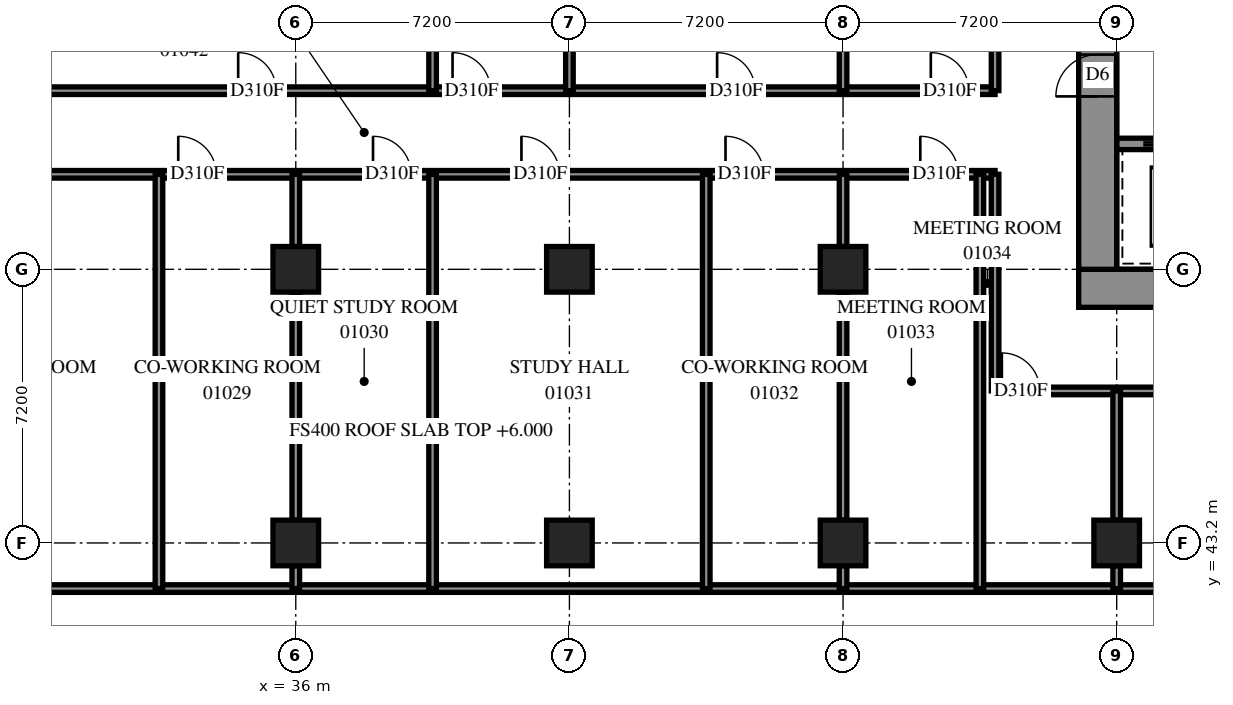
"""IFC4 building model, lengths in metres.
Left out: names, types, materials, properties, quantities, classifications, styles, units other than length and angle.
Written with IfcOpenShell. Run it as: python <this file> out.ifc"""

import sys

from ifc_helpers import new_model, si_unit, direction, frame, frame_2d, origin, origin_2d, place, context, subcontext, project, spatial, rectangle, extrude, element, fill, save


model = new_model("IFC4")
c1 = context("Model", 3, precision=1e-05, world=origin(), true_north=direction((0.0, 1.0)))
c2 = subcontext(c1, "Body", "Model", "MODEL_VIEW")
j1 = project(units=[si_unit("LENGTHUNIT", "METRE"), si_unit("PLANEANGLEUNIT", "RADIAN")], contexts=[c1])
p1 = place(None, origin())
s1 = spatial("IfcSite", under=j1, at=p1, CompositionType="ELEMENT")
p2 = place(p1, origin())
s2 = spatial("IfcBuilding", under=s1, at=p2, CompositionType="ELEMENT")
p3 = place(p2, frame((0.0, 0.0, 6.0)))
s3 = spatial("IfcBuildingStorey", under=s2, at=p3, CompositionType="ELEMENT", Elevation=6.0)
for number, where, z_axis, x_axis in (
    (1, (36.0, 43.2, 0.0), (0.0, 0.0, 1.0), (1.0, 0.0, 0.0)),
    (2, (36.0, 50.4, 0.0), (0.0, 0.0, 1.0), (1.0, 0.0, 0.0)),
    (3, (43.2, 43.2, 0.0), (0.0, 0.0, 1.0), (1.0, 0.0, 0.0)),
    (4, (43.2, 50.4, 0.0), (0.0, 0.0, 1.0), (1.0, 0.0, 0.0)),
    (5, (50.4, 43.2, 0.0), (0.0, 0.0, 1.0), (1.0, 0.0, 0.0)),
    (6, (50.4, 50.4, 0.0), (0.0, 0.0, 1.0), (1.0, 0.0, 0.0)),
    (7, (57.6, 43.2, 0.0), (0.0, 0.0, 1.0), (1.0, 0.0, 0.0)),
):
    element("IfcColumn", number, at=place(p3, frame(where, z_axis=z_axis, x_axis=x_axis)), inside=s3, PredefinedType="COLUMN", context=c2, shape_type="SweptSolid", body=[
        extrude(rectangle(XDim=1.2, YDim=1.2, at=origin_2d()), origin(), (0.0, 0.0, 1.0), 3.8),
    ])
p4 = place(p3, frame((56.6, 49.9, -0.4), z_axis=(0.0, 0.0, 1.0), x_axis=(1.0, 0.0, 0.0)))
e8 = element("IfcWall", 8, at=p4, inside=s3, PredefinedType="SHEAR", context=c2, shape_type="SweptSolid", body=[
    extrude(rectangle(XDim=16.4, YDim=1.0, at=frame_2d((8.2, 0.0))), origin(), (0.0, 0.0, 1.0), 3.5),
])
p5 = place(p3, frame((57.1, 50.4, -0.4), z_axis=(0.0, 0.0, 1.0), x_axis=(0.0, 1.0, 0.0)))
e9 = element("IfcWall", 9, at=p5, inside=s3, PredefinedType="SHEAR", context=c2, shape_type="SweptSolid", body=[
    extrude(rectangle(XDim=14.4, YDim=1.0, at=frame_2d((7.2, 0.0))), origin(), (0.0, 0.0, 1.0), 3.5),
])
p6 = place(p5, frame((4.55, 0.0, 0.4)))
e10 = element("IfcOpeningElement", 10, at=p6, cuts=e9, PredefinedType="OPENING", context=c2, shape_type="SweptSolid", body=[
    extrude(rectangle(XDim=1.1, YDim=2.1, at=frame_2d((0.55, 1.05))), frame((0.0, 0.51, 0.0), z_axis=(0.0, -1.0, 0.0), x_axis=(1.0, 0.0, 0.0)), (0.0, 0.0, 1.0), 1.02),
])
p7 = place(p5, frame((11.35, 0.0, 0.4)))
e11 = element("IfcOpeningElement", 11, at=p7, cuts=e9, PredefinedType="OPENING", context=c2, shape_type="SweptSolid", body=[
    extrude(rectangle(XDim=1.1, YDim=2.1, at=frame_2d((0.55, 1.05))), frame((0.0, 0.51, 0.0), z_axis=(0.0, -1.0, 0.0), x_axis=(1.0, 0.0, 0.0)), (0.0, 0.0, 1.0), 1.02),
])
p8 = place(p3, frame((57.6, 53.7, 0.0), z_axis=(0.0, 0.0, 1.0), x_axis=(1.0, 0.0, 0.0)))
e12 = element("IfcWall", 12, at=p8, inside=s3, PredefinedType="SOLIDWALL", context=c2, shape_type="SweptSolid", body=[
    extrude(rectangle(XDim=14.4, YDim=0.3, at=frame_2d((7.2, 0.0))), origin(), (0.0, 0.0, 1.0), 3.8),
])
p9 = place(p8, frame((1.25, 0.0, 0.0)))
e13 = element("IfcOpeningElement", 13, at=p9, cuts=e12, PredefinedType="OPENING", context=c2, shape_type="SweptSolid", body=[
    extrude(rectangle(XDim=1.1, YDim=2.1, at=frame_2d((0.55, 1.05))), frame((0.0, 0.16, 0.0), z_axis=(0.0, -1.0, 0.0), x_axis=(1.0, 0.0, 0.0)), (0.0, 0.0, 1.0), 0.32),
])
p10 = place(p8, frame((4.85, 0.0, 0.0)))
e14 = element("IfcOpeningElement", 14, at=p10, cuts=e12, PredefinedType="OPENING", context=c2, shape_type="SweptSolid", body=[
    extrude(rectangle(XDim=1.1, YDim=2.1, at=frame_2d((0.55, 1.05))), frame((0.0, 0.16, 0.0), z_axis=(0.0, -1.0, 0.0), x_axis=(1.0, 0.0, 0.0)), (0.0, 0.0, 1.0), 0.32),
])
p11 = place(p8, frame((8.45, 0.0, 0.0)))
e15 = element("IfcOpeningElement", 15, at=p11, cuts=e12, PredefinedType="OPENING", context=c2, shape_type="SweptSolid", body=[
    extrude(rectangle(XDim=1.1, YDim=2.1, at=frame_2d((0.55, 1.05))), frame((0.0, 0.16, 0.0), z_axis=(0.0, -1.0, 0.0), x_axis=(1.0, 0.0, 0.0)), (0.0, 0.0, 1.0), 0.32),
])
p12 = place(p8, frame((12.05, 0.0, 0.0)))
e16 = element("IfcOpeningElement", 16, at=p12, cuts=e12, PredefinedType="OPENING", context=c2, shape_type="SweptSolid", body=[
    extrude(rectangle(XDim=1.1, YDim=2.1, at=frame_2d((0.55, 1.05))), frame((0.0, 0.16, 0.0), z_axis=(0.0, -1.0, 0.0), x_axis=(1.0, 0.0, 0.0)), (0.0, 0.0, 1.0), 0.32),
])
p13 = place(p3, frame((13.33, 42.0, 0.0), z_axis=(0.0, 0.0, 1.0), x_axis=(1.0, 0.0, 0.0)))
e17 = element("IfcWall", 17, at=p13, inside=s3, PredefinedType="PARTITIONING", context=c2, shape_type="SweptSolid", body=[
    extrude(rectangle(XDim=59.74, YDim=0.2, at=frame_2d((29.87, 0.0))), origin(), (0.0, 0.0, 1.0), 3.8),
])
p14 = place(p3, frame((0.0, 55.1, 0.0), z_axis=(0.0, 0.0, 1.0), x_axis=(1.0, 0.0, 0.0)))
e18 = element("IfcWall", 18, at=p14, inside=s3, PredefinedType="PARTITIONING", context=c2, shape_type="SweptSolid", body=[
    extrude(rectangle(XDim=54.4, YDim=0.2, at=frame_2d((27.2, 0.0))), origin(), (0.0, 0.0, 1.0), 3.8),
])
p15 = place(p14, frame((10.485, 0.0, 0.0)))
e19 = element("IfcOpeningElement", 19, at=p15, cuts=e18, PredefinedType="OPENING", context=c2, shape_type="SweptSolid", body=[
    extrude(rectangle(XDim=1.0, YDim=2.1, at=frame_2d((0.5, 1.05))), frame((0.0, 0.11, 0.0), z_axis=(0.0, -1.0, 0.0), x_axis=(1.0, 0.0, 0.0)), (0.0, 0.0, 1.0), 0.22),
])
p16 = place(p14, frame((16.475, 0.0, 0.0)))
e20 = element("IfcOpeningElement", 20, at=p16, cuts=e18, PredefinedType="OPENING", context=c2, shape_type="SweptSolid", body=[
    extrude(rectangle(XDim=1.0, YDim=2.1, at=frame_2d((0.5, 1.05))), frame((0.0, 0.11, 0.0), z_axis=(0.0, -1.0, 0.0), x_axis=(1.0, 0.0, 0.0)), (0.0, 0.0, 1.0), 0.22),
])
p17 = place(p14, frame((22.025, 0.0, 0.0)))
e21 = element("IfcOpeningElement", 21, at=p17, cuts=e18, PredefinedType="OPENING", context=c2, shape_type="SweptSolid", body=[
    extrude(rectangle(XDim=1.0, YDim=2.1, at=frame_2d((0.5, 1.05))), frame((0.0, 0.11, 0.0), z_axis=(0.0, -1.0, 0.0), x_axis=(1.0, 0.0, 0.0)), (0.0, 0.0, 1.0), 0.22),
])
p18 = place(p14, frame((34.484, 0.0, 0.0)))
e22 = element("IfcOpeningElement", 22, at=p18, cuts=e18, PredefinedType="OPENING", context=c2, shape_type="SweptSolid", body=[
    extrude(rectangle(XDim=1.0, YDim=2.1, at=frame_2d((0.5, 1.05))), frame((0.0, 0.11, 0.0), z_axis=(0.0, -1.0, 0.0), x_axis=(1.0, 0.0, 0.0)), (0.0, 0.0, 1.0), 0.22),
])
p19 = place(p14, frame((40.125, 0.0, 0.0)))
e23 = element("IfcOpeningElement", 23, at=p19, cuts=e18, PredefinedType="OPENING", context=c2, shape_type="SweptSolid", body=[
    extrude(rectangle(XDim=1.0, YDim=2.1, at=frame_2d((0.5, 1.05))), frame((0.0, 0.11, 0.0), z_axis=(0.0, -1.0, 0.0), x_axis=(1.0, 0.0, 0.0)), (0.0, 0.0, 1.0), 0.22),
])
p20 = place(p14, frame((47.086, 0.0, 0.0)))
e24 = element("IfcOpeningElement", 24, at=p20, cuts=e18, PredefinedType="OPENING", context=c2, shape_type="SweptSolid", body=[
    extrude(rectangle(XDim=1.0, YDim=2.1, at=frame_2d((0.5, 1.05))), frame((0.0, 0.11, 0.0), z_axis=(0.0, -1.0, 0.0), x_axis=(1.0, 0.0, 0.0)), (0.0, 0.0, 1.0), 0.22),
])
p21 = place(p14, frame((52.709, 0.0, 0.0)))
e25 = element("IfcOpeningElement", 25, at=p21, cuts=e18, PredefinedType="OPENING", context=c2, shape_type="SweptSolid", body=[
    extrude(rectangle(XDim=1.0, YDim=2.1, at=frame_2d((0.5, 1.05))), frame((0.0, 0.11, 0.0), z_axis=(0.0, -1.0, 0.0), x_axis=(1.0, 0.0, 0.0)), (0.0, 0.0, 1.0), 0.22),
])
p22 = place(p14, frame((2.451, 0.0, 0.0)))
e26 = element("IfcOpeningElement", 26, at=p22, cuts=e18, PredefinedType="OPENING", context=c2, shape_type="SweptSolid", body=[
    extrude(rectangle(XDim=1.0, YDim=2.1, at=frame_2d((0.5, 1.05))), frame((0.0, 0.11, 0.0), z_axis=(0.0, -1.0, 0.0), x_axis=(1.0, 0.0, 0.0)), (0.0, 0.0, 1.0), 0.22),
])
p23 = place(p3, frame((0.0, 52.9, 0.0), z_axis=(0.0, 0.0, 1.0), x_axis=(1.0, 0.0, 0.0)))
e27 = element("IfcWall", 27, at=p23, inside=s3, PredefinedType="PARTITIONING", context=c2, shape_type="SweptSolid", body=[
    extrude(rectangle(XDim=54.4, YDim=0.2, at=frame_2d((27.2, 0.0))), origin(), (0.0, 0.0, 1.0), 3.8),
])
p24 = place(p23, frame((8.689, 0.0, 0.0)))
e28 = element("IfcOpeningElement", 28, at=p24, cuts=e27, PredefinedType="OPENING", context=c2, shape_type="SweptSolid", body=[
    extrude(rectangle(XDim=1.0, YDim=2.1, at=frame_2d((0.5, 1.05))), frame((0.0, 0.11, 0.0), z_axis=(0.0, -1.0, 0.0), x_axis=(1.0, 0.0, 0.0)), (0.0, 0.0, 1.0), 0.22),
])
p25 = place(p23, frame((11.325, 0.0, 0.0)))
e29 = element("IfcOpeningElement", 29, at=p25, cuts=e27, PredefinedType="OPENING", context=c2, shape_type="SweptSolid", body=[
    extrude(rectangle(XDim=1.0, YDim=2.1, at=frame_2d((0.5, 1.05))), frame((0.0, 0.11, 0.0), z_axis=(0.0, -1.0, 0.0), x_axis=(1.0, 0.0, 0.0)), (0.0, 0.0, 1.0), 0.22),
])
p26 = place(p23, frame((18.262, 0.0, 0.0)))
e30 = element("IfcOpeningElement", 30, at=p26, cuts=e27, PredefinedType="OPENING", context=c2, shape_type="SweptSolid", body=[
    extrude(rectangle(XDim=1.0, YDim=2.1, at=frame_2d((0.5, 1.05))), frame((0.0, 0.11, 0.0), z_axis=(0.0, -1.0, 0.0), x_axis=(1.0, 0.0, 0.0)), (0.0, 0.0, 1.0), 0.22),
])
p27 = place(p23, frame((23.633, 0.0, 0.0)))
e31 = element("IfcOpeningElement", 31, at=p27, cuts=e27, PredefinedType="OPENING", context=c2, shape_type="SweptSolid", body=[
    extrude(rectangle(XDim=1.0, YDim=2.1, at=frame_2d((0.5, 1.05))), frame((0.0, 0.11, 0.0), z_axis=(0.0, -1.0, 0.0), x_axis=(1.0, 0.0, 0.0)), (0.0, 0.0, 1.0), 0.22),
])
p28 = place(p23, frame((27.538, 0.0, 0.0)))
e32 = element("IfcOpeningElement", 32, at=p28, cuts=e27, PredefinedType="OPENING", context=c2, shape_type="SweptSolid", body=[
    extrude(rectangle(XDim=1.0, YDim=2.1, at=frame_2d((0.5, 1.05))), frame((0.0, 0.11, 0.0), z_axis=(0.0, -1.0, 0.0), x_axis=(1.0, 0.0, 0.0)), (0.0, 0.0, 1.0), 0.22),
])
p29 = place(p23, frame((32.907, 0.0, 0.0)))
e33 = element("IfcOpeningElement", 33, at=p29, cuts=e27, PredefinedType="OPENING", context=c2, shape_type="SweptSolid", body=[
    extrude(rectangle(XDim=1.0, YDim=2.1, at=frame_2d((0.5, 1.05))), frame((0.0, 0.11, 0.0), z_axis=(0.0, -1.0, 0.0), x_axis=(1.0, 0.0, 0.0)), (0.0, 0.0, 1.0), 0.22),
])
p30 = place(p23, frame((38.032, 0.0, 0.0)))
e34 = element("IfcOpeningElement", 34, at=p30, cuts=e27, PredefinedType="OPENING", context=c2, shape_type="SweptSolid", body=[
    extrude(rectangle(XDim=1.0, YDim=2.1, at=frame_2d((0.5, 1.05))), frame((0.0, 0.11, 0.0), z_axis=(0.0, -1.0, 0.0), x_axis=(1.0, 0.0, 0.0)), (0.0, 0.0, 1.0), 0.22),
])
p31 = place(p23, frame((41.938, 0.0, 0.0)))
e35 = element("IfcOpeningElement", 35, at=p31, cuts=e27, PredefinedType="OPENING", context=c2, shape_type="SweptSolid", body=[
    extrude(rectangle(XDim=1.0, YDim=2.1, at=frame_2d((0.5, 1.05))), frame((0.0, 0.11, 0.0), z_axis=(0.0, -1.0, 0.0), x_axis=(1.0, 0.0, 0.0)), (0.0, 0.0, 1.0), 0.22),
])
p32 = place(p23, frame((47.307, 0.0, 0.0)))
e36 = element("IfcOpeningElement", 36, at=p32, cuts=e27, PredefinedType="OPENING", context=c2, shape_type="SweptSolid", body=[
    extrude(rectangle(XDim=1.0, YDim=2.1, at=frame_2d((0.5, 1.05))), frame((0.0, 0.11, 0.0), z_axis=(0.0, -1.0, 0.0), x_axis=(1.0, 0.0, 0.0)), (0.0, 0.0, 1.0), 0.22),
])
p33 = place(p23, frame((52.432, 0.0, 0.0)))
e37 = element("IfcOpeningElement", 37, at=p33, cuts=e27, PredefinedType="OPENING", context=c2, shape_type="SweptSolid", body=[
    extrude(rectangle(XDim=1.0, YDim=2.1, at=frame_2d((0.5, 1.05))), frame((0.0, 0.11, 0.0), z_axis=(0.0, -1.0, 0.0), x_axis=(1.0, 0.0, 0.0)), (0.0, 0.0, 1.0), 0.22),
])
p34 = place(p23, frame((2.288, 0.0, 0.0)))
e38 = element("IfcOpeningElement", 38, at=p34, cuts=e27, PredefinedType="OPENING", context=c2, shape_type="SweptSolid", body=[
    extrude(rectangle(XDim=1.0, YDim=2.1, at=frame_2d((0.5, 1.05))), frame((0.0, 0.11, 0.0), z_axis=(0.0, -1.0, 0.0), x_axis=(1.0, 0.0, 0.0)), (0.0, 0.0, 1.0), 0.22),
])
p35 = place(p23, frame((4.772, 0.0, 0.0)))
e39 = element("IfcOpeningElement", 39, at=p35, cuts=e27, PredefinedType="OPENING", context=c2, shape_type="SweptSolid", body=[
    extrude(rectangle(XDim=1.0, YDim=2.1, at=frame_2d((0.5, 1.05))), frame((0.0, 0.11, 0.0), z_axis=(0.0, -1.0, 0.0), x_axis=(1.0, 0.0, 0.0)), (0.0, 0.0, 1.0), 0.22),
])
p36 = place(p3, frame((54.4, 47.2, 0.0), z_axis=(0.0, 0.0, 1.0), x_axis=(1.0, 0.0, 0.0)))
e40 = element("IfcWall", 40, at=p36, inside=s3, PredefinedType="PARTITIONING", context=c2, shape_type="SweptSolid", body=[
    extrude(rectangle(XDim=19.618, YDim=0.2, at=frame_2d((9.809, 0.0))), origin(), (0.0, 0.0, 1.0), 3.8),
])
p37 = place(p36, frame((0.178, 0.0, 0.0)))
e41 = element("IfcOpeningElement", 41, at=p37, cuts=e40, PredefinedType="OPENING", context=c2, shape_type="SweptSolid", body=[
    extrude(rectangle(XDim=1.0, YDim=2.1, at=frame_2d((0.5, 1.05))), frame((0.0, 0.11, 0.0), z_axis=(0.0, -1.0, 0.0), x_axis=(1.0, 0.0, 0.0)), (0.0, 0.0, 1.0), 0.22),
])
p38 = place(p36, frame((7.062, 0.0, 0.0)))
e42 = element("IfcOpeningElement", 42, at=p38, cuts=e40, PredefinedType="OPENING", context=c2, shape_type="SweptSolid", body=[
    extrude(rectangle(XDim=1.0, YDim=2.1, at=frame_2d((0.5, 1.05))), frame((0.0, 0.11, 0.0), z_axis=(0.0, -1.0, 0.0), x_axis=(1.0, 0.0, 0.0)), (0.0, 0.0, 1.0), 0.22),
])
p39 = place(p36, frame((14.262, 0.0, 0.0)))
e43 = element("IfcOpeningElement", 43, at=p39, cuts=e40, PredefinedType="OPENING", context=c2, shape_type="SweptSolid", body=[
    extrude(rectangle(XDim=1.0, YDim=2.1, at=frame_2d((0.5, 1.05))), frame((0.0, 0.11, 0.0), z_axis=(0.0, -1.0, 0.0), x_axis=(1.0, 0.0, 0.0)), (0.0, 0.0, 1.0), 0.22),
])
for number, where, z_axis, x_axis in (
    (44, (32.4, 42.0, 0.0), (0.0, 0.0, 1.0), (0.0, 1.0, 0.0)),
    (45, (39.6, 42.0, 0.0), (0.0, 0.0, 1.0), (0.0, 1.0, 0.0)),
    (46, (46.8, 42.0, 0.0), (0.0, 0.0, 1.0), (0.0, 1.0, 0.0)),
    (47, (54.0, 42.0, 0.0), (0.0, 0.0, 1.0), (0.0, 1.0, 0.0)),
):
    element("IfcWall", number, at=place(p3, frame(where, z_axis=z_axis, x_axis=x_axis)), inside=s3, PredefinedType="PARTITIONING", context=c2, shape_type="SweptSolid", body=[
        extrude(rectangle(XDim=10.9, YDim=0.2, at=frame_2d((5.45, 0.0))), origin(), (0.0, 0.0, 1.0), 3.8),
    ])
for number, where, z_axis, x_axis in (
    (48, (36.0, 43.8, 0.0), (0.0, 0.0, 1.0), (0.0, 1.0, 0.0)),
    (49, (50.4, 43.8, 0.0), (0.0, 0.0, 1.0), (0.0, 1.0, 0.0)),
):
    element("IfcWall", number, at=place(p3, frame(where, z_axis=z_axis, x_axis=x_axis)), inside=s3, PredefinedType="PARTITIONING", context=c2, shape_type="SweptSolid", body=[
        extrude(rectangle(XDim=6.0, YDim=0.2, at=frame_2d((3.0, 0.0))), origin(), (0.0, 0.0, 1.0), 3.8),
    ])
p40 = place(p3, frame((54.4, 47.2, 0.0), z_axis=(0.0, 0.0, 1.0), x_axis=(0.0, 1.0, 0.0)))
e50 = element("IfcWall", 50, at=p40, inside=s3, PredefinedType="PARTITIONING", context=c2, shape_type="SweptSolid", body=[
    extrude(rectangle(XDim=5.7, YDim=0.2, at=frame_2d((2.85, 0.0))), origin(), (0.0, 0.0, 1.0), 3.8),
])
p41 = place(p3, frame((39.6, 55.1, 0.0), z_axis=(0.0, 0.0, 1.0), x_axis=(0.0, 1.0, 0.0)))
e51 = element("IfcWall", 51, at=p41, inside=s3, PredefinedType="PARTITIONING", context=c2, shape_type="SweptSolid", body=[
    extrude(rectangle(XDim=5.0, YDim=0.2, at=frame_2d((2.5, 0.0))), origin(), (0.0, 0.0, 1.0), 3.8),
])
p42 = place(p3, frame((54.4, 55.102, 0.0), z_axis=(0.0, 0.0, 1.0), x_axis=(0.0, 1.0, 0.0)))
e52 = element("IfcWall", 52, at=p42, inside=s3, PredefinedType="PARTITIONING", context=c2, shape_type="SweptSolid", body=[
    extrude(rectangle(XDim=4.998, YDim=0.2, at=frame_2d((2.499, 0.0))), origin(), (0.0, 0.0, 1.0), 3.8),
])
p43 = place(p3, frame((57.6, 43.8, 0.0), z_axis=(0.0, 0.0, 1.0), x_axis=(0.0, 1.0, 0.0)))
e53 = element("IfcWall", 53, at=p43, inside=s3, PredefinedType="PARTITIONING", context=c2, shape_type="SweptSolid", body=[
    extrude(rectangle(XDim=3.4, YDim=0.2, at=frame_2d((1.7, 0.0))), origin(), (0.0, 0.0, 1.0), 3.8),
])
for number, where, z_axis, x_axis in (
    (54, (36.0, 51.0, 0.0), (0.0, 0.0, 1.0), (0.0, 1.0, 0.0)),
    (55, (43.2, 55.1, 0.0), (0.0, 0.0, 1.0), (0.0, 1.0, 0.0)),
    (56, (50.4, 51.0, 0.0), (0.0, 0.0, 1.0), (0.0, 1.0, 0.0)),
    (57, (50.4, 55.1, 0.0), (0.0, 0.0, 1.0), (0.0, 1.0, 0.0)),
):
    element("IfcWall", number, at=place(p3, frame(where, z_axis=z_axis, x_axis=x_axis)), inside=s3, PredefinedType="PARTITIONING", context=c2, shape_type="SweptSolid", body=[
        extrude(rectangle(XDim=1.9, YDim=0.2, at=frame_2d((0.95, 0.0))), origin(), (0.0, 0.0, 1.0), 3.8),
    ])
for number, where, z_axis, x_axis in (
    (58, (36.0, 42.0, 0.0), (0.0, 0.0, 1.0), (0.0, 1.0, 0.0)),
    (59, (50.4, 42.0, 0.0), (0.0, 0.0, 1.0), (0.0, 1.0, 0.0)),
    (60, (57.6, 42.0, 0.0), (0.0, 0.0, 1.0), (0.0, 1.0, 0.0)),
):
    element("IfcWall", number, at=place(p3, frame(where, z_axis=z_axis, x_axis=x_axis)), inside=s3, PredefinedType="PARTITIONING", context=c2, shape_type="SweptSolid", body=[
        extrude(rectangle(XDim=0.6, YDim=0.2, at=frame_2d((0.3, 0.0))), origin(), (0.0, 0.0, 1.0), 3.8),
    ])
p44 = place(p6, origin())
e61 = element("IfcDoor", 61, at=p44, inside=s3, OperationType="DOUBLE_DOOR_SINGLE_SWING", PredefinedType="DOOR", context=c2, shape_type="SweptSolid", body=[
    extrude(rectangle(XDim=1.1, YDim=2.1, at=frame_2d((0.55, 1.05))), frame((0.0, 0.025, 0.0), z_axis=(0.0, -1.0, 0.0), x_axis=(1.0, 0.0, 0.0)), (0.0, 0.0, 1.0), 0.05),
])
fill(e10, e61)
p45 = place(p29, origin())
e62 = element("IfcDoor", 62, at=p45, inside=s3, OperationType="SINGLE_SWING_RIGHT", PredefinedType="DOOR", context=c2, shape_type="SweptSolid", body=[
    extrude(rectangle(XDim=1.0, YDim=2.1, at=frame_2d((0.5, 1.05))), frame((0.0, 0.025, 0.0), z_axis=(0.0, -1.0, 0.0), x_axis=(1.0, 0.0, 0.0)), (0.0, 0.0, 1.0), 0.05),
])
fill(e33, e62)
p46 = place(p30, origin())
e63 = element("IfcDoor", 63, at=p46, inside=s3, OperationType="SINGLE_SWING_LEFT", PredefinedType="DOOR", context=c2, shape_type="SweptSolid", body=[
    extrude(rectangle(XDim=1.0, YDim=2.1, at=frame_2d((0.5, 1.05))), frame((0.0, 0.025, 0.0), z_axis=(0.0, -1.0, 0.0), x_axis=(1.0, 0.0, 0.0)), (0.0, 0.0, 1.0), 0.05),
])
fill(e34, e63)
p47 = place(p31, origin())
e64 = element("IfcDoor", 64, at=p47, inside=s3, OperationType="SINGLE_SWING_RIGHT", PredefinedType="DOOR", context=c2, shape_type="SweptSolid", body=[
    extrude(rectangle(XDim=1.0, YDim=2.1, at=frame_2d((0.5, 1.05))), frame((0.0, 0.025, 0.0), z_axis=(0.0, -1.0, 0.0), x_axis=(1.0, 0.0, 0.0)), (0.0, 0.0, 1.0), 0.05),
])
fill(e35, e64)
p48 = place(p32, origin())
e65 = element("IfcDoor", 65, at=p48, inside=s3, OperationType="SINGLE_SWING_RIGHT", PredefinedType="DOOR", context=c2, shape_type="SweptSolid", body=[
    extrude(rectangle(XDim=1.0, YDim=2.1, at=frame_2d((0.5, 1.05))), frame((0.0, 0.025, 0.0), z_axis=(0.0, -1.0, 0.0), x_axis=(1.0, 0.0, 0.0)), (0.0, 0.0, 1.0), 0.05),
])
fill(e36, e65)
p49 = place(p33, origin())
e66 = element("IfcDoor", 66, at=p49, inside=s3, OperationType="SINGLE_SWING_LEFT", PredefinedType="DOOR", context=c2, shape_type="SweptSolid", body=[
    extrude(rectangle(XDim=1.0, YDim=2.1, at=frame_2d((0.5, 1.05))), frame((0.0, 0.025, 0.0), z_axis=(0.0, -1.0, 0.0), x_axis=(1.0, 0.0, 0.0)), (0.0, 0.0, 1.0), 0.05),
])
fill(e37, e66)
p50 = place(p37, origin())
e67 = element("IfcDoor", 67, at=p50, inside=s3, OperationType="SINGLE_SWING_RIGHT", PredefinedType="DOOR", context=c2, shape_type="SweptSolid", body=[
    extrude(rectangle(XDim=1.0, YDim=2.1, at=frame_2d((0.5, 1.05))), frame((0.0, 0.025, 0.0), z_axis=(0.0, -1.0, 0.0), x_axis=(1.0, 0.0, 0.0)), (0.0, 0.0, 1.0), 0.05),
])
fill(e41, e67)
p51 = place(p18, origin())
e68 = element("IfcDoor", 68, at=p51, inside=s3, OperationType="SINGLE_SWING_RIGHT", PredefinedType="DOOR", context=c2, shape_type="SweptSolid", body=[
    extrude(rectangle(XDim=1.0, YDim=2.1, at=frame_2d((0.5, 1.05))), frame((0.0, 0.025, 0.0), z_axis=(0.0, -1.0, 0.0), x_axis=(1.0, 0.0, 0.0)), (0.0, 0.0, 1.0), 0.05),
])
fill(e22, e68)
p52 = place(p19, origin())
e69 = element("IfcDoor", 69, at=p52, inside=s3, OperationType="SINGLE_SWING_LEFT", PredefinedType="DOOR", context=c2, shape_type="SweptSolid", body=[
    extrude(rectangle(XDim=1.0, YDim=2.1, at=frame_2d((0.5, 1.05))), frame((0.0, 0.025, 0.0), z_axis=(0.0, -1.0, 0.0), x_axis=(1.0, 0.0, 0.0)), (0.0, 0.0, 1.0), 0.05),
])
fill(e23, e69)
p53 = place(p20, origin())
e70 = element("IfcDoor", 70, at=p53, inside=s3, OperationType="SINGLE_SWING_RIGHT", PredefinedType="DOOR", context=c2, shape_type="SweptSolid", body=[
    extrude(rectangle(XDim=1.0, YDim=2.1, at=frame_2d((0.5, 1.05))), frame((0.0, 0.025, 0.0), z_axis=(0.0, -1.0, 0.0), x_axis=(1.0, 0.0, 0.0)), (0.0, 0.0, 1.0), 0.05),
])
fill(e24, e70)
p54 = place(p21, origin())
e71 = element("IfcDoor", 71, at=p54, inside=s3, OperationType="SINGLE_SWING_RIGHT", PredefinedType="DOOR", context=c2, shape_type="SweptSolid", body=[
    extrude(rectangle(XDim=1.0, YDim=2.1, at=frame_2d((0.5, 1.05))), frame((0.0, 0.025, 0.0), z_axis=(0.0, -1.0, 0.0), x_axis=(1.0, 0.0, 0.0)), (0.0, 0.0, 1.0), 0.05),
])
fill(e25, e71)
save(model, sys.argv[1])
